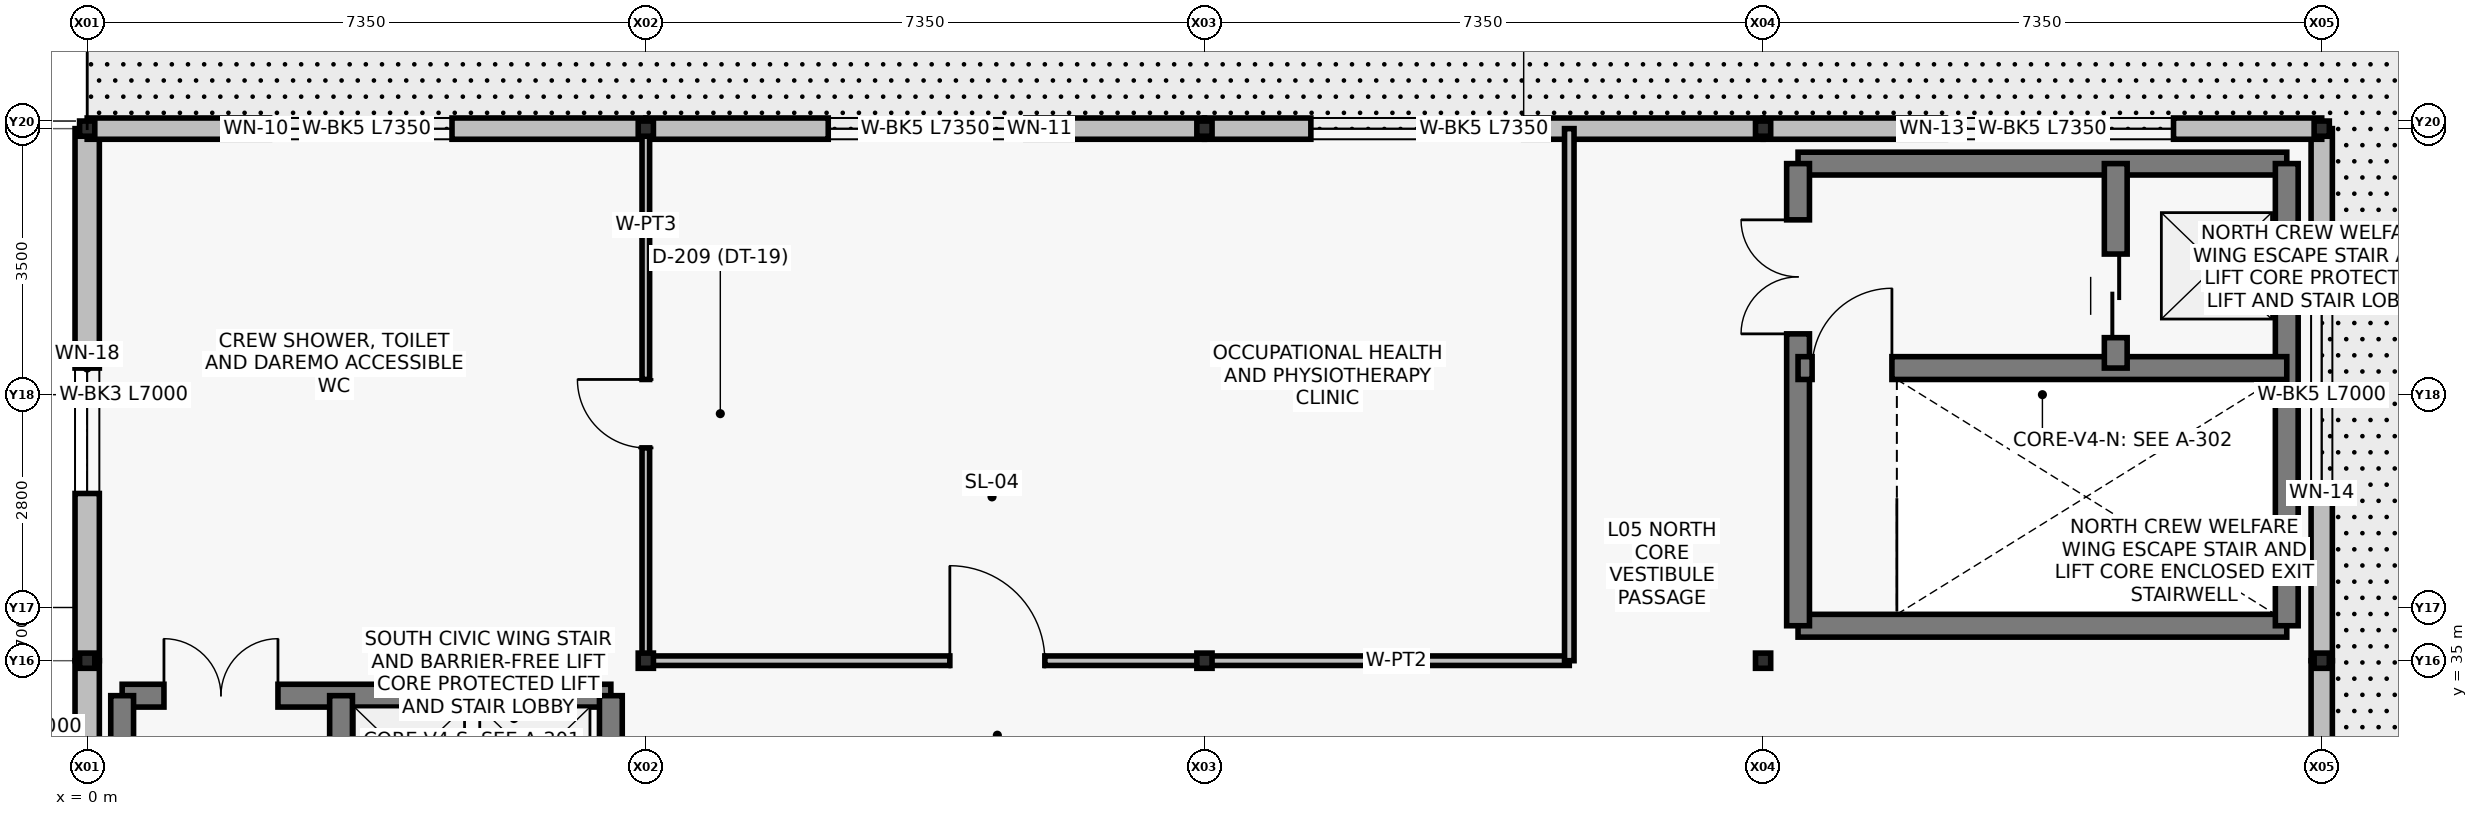
"""IFC4 building model, lengths in metres.
Left out: names, types, materials, properties, quantities, classifications, styles, units other than length and angle.
Written with IfcOpenShell. Run it as: python <this file> out.ifc"""

import sys

from ifc_helpers import new_model, si_unit, direction, frame, frame_2d, origin, origin_2d, place, context, subcontext, project, spatial, rectangle, i_section, extrude, element, fill, save


model = new_model("IFC4")
c1 = context("Model", 3, precision=1e-05, world=origin(), true_north=direction((0.0, 1.0)))
c2 = subcontext(c1, "Body", "Model", "MODEL_VIEW")
j1 = project(units=[si_unit("LENGTHUNIT", "METRE"), si_unit("PLANEANGLEUNIT", "RADIAN")], contexts=[c1])
p1 = place(None, origin())
s1 = spatial("IfcSite", under=j1, at=p1, CompositionType="ELEMENT")
p2 = place(p1, origin())
s2 = spatial("IfcBuilding", under=s1, at=p2, CompositionType="ELEMENT")
p3 = place(p2, frame((0.0, 0.0, 19.5)))
s3 = spatial("IfcBuildingStorey", under=s2, at=p3, CompositionType="ELEMENT", Elevation=19.5)
for number, where, z_axis, x_axis in (
    (1, (0.0, 35.0, 0.0), (0.0, 0.0, 1.0), (1.0, 0.0, 0.0)),
    (2, (0.0, 42.0, 0.0), (0.0, 0.0, 1.0), (1.0, 0.0, 0.0)),
    (3, (7.35, 35.0, 0.0), (0.0, 0.0, 1.0), (1.0, 0.0, 0.0)),
    (4, (7.35, 42.0, 0.0), (0.0, 0.0, 1.0), (1.0, 0.0, 0.0)),
    (5, (14.7, 35.0, 0.0), (0.0, 0.0, 1.0), (1.0, 0.0, 0.0)),
    (6, (14.7, 42.0, 0.0), (0.0, 0.0, 1.0), (1.0, 0.0, 0.0)),
    (7, (22.05, 35.0, 0.0), (0.0, 0.0, 1.0), (1.0, 0.0, 0.0)),
    (8, (22.05, 42.0, 0.0), (0.0, 0.0, 1.0), (1.0, 0.0, 0.0)),
    (9, (29.4, 35.0, 0.0), (0.0, 0.0, 1.0), (1.0, 0.0, 0.0)),
    (10, (29.4, 42.0, 0.0), (0.0, 0.0, 1.0), (1.0, 0.0, 0.0)),
):
    element("IfcColumn", number, at=place(p3, frame(where, z_axis=z_axis, x_axis=x_axis)), inside=s3, PredefinedType="COLUMN", context=c2, shape_type="SweptSolid", body=[
        extrude(i_section(OverallWidth=0.2, OverallDepth=0.2, WebThickness=0.008, FlangeThickness=0.012, at=origin_2d()), origin(), (0.0, 0.0, 1.0), 4.2),
    ])
p4 = place(p3, frame((0.0, 28.0, 0.0), z_axis=(0.0, 0.0, 1.0), x_axis=(0.0, 1.0, 0.0)))
e11 = element("IfcWall", 11, at=p4, inside=s3, PredefinedType="SOLIDWALL", context=c2, shape_type="SweptSolid", body=[
    extrude(rectangle(XDim=7.0, YDim=0.32, at=frame_2d((3.5, 0.0))), origin(), (0.0, 0.0, 1.0), 3.48),
])
p5 = place(p4, frame((2.2, 0.0, 0.9)))
e12 = element("IfcOpeningElement", 12, at=p5, cuts=e11, PredefinedType="OPENING", context=c2, shape_type="SweptSolid", body=[
    extrude(rectangle(XDim=3.0, YDim=1.8, at=frame_2d((1.5, 0.9))), frame((0.0, 0.17, 0.0), z_axis=(0.0, -1.0, 0.0), x_axis=(1.0, 0.0, 0.0)), (0.0, 0.0, 1.0), 0.34),
])
p6 = place(p3, frame((0.0, 35.0, 0.0), z_axis=(0.0, 0.0, 1.0), x_axis=(0.0, 1.0, 0.0)))
e13 = element("IfcWall", 13, at=p6, inside=s3, PredefinedType="SOLIDWALL", context=c2, shape_type="SweptSolid", body=[
    extrude(rectangle(XDim=7.0, YDim=0.32, at=frame_2d((3.5, 0.0))), origin(), (0.0, 0.0, 1.0), 3.48),
])
p7 = place(p6, frame((2.2, 0.0, 0.9)))
e14 = element("IfcOpeningElement", 14, at=p7, cuts=e13, PredefinedType="OPENING", context=c2, shape_type="SweptSolid", body=[
    extrude(rectangle(XDim=1.65, YDim=1.95, at=frame_2d((0.825, 0.975))), frame((0.0, 0.17, 0.0), z_axis=(0.0, -1.0, 0.0), x_axis=(1.0, 0.0, 0.0)), (0.0, 0.0, 1.0), 0.34),
])
p8 = place(p3, frame((29.4, 28.0, 0.0), z_axis=(0.0, 0.0, 1.0), x_axis=(0.0, 1.0, 0.0)))
e15 = element("IfcWall", 15, at=p8, inside=s3, PredefinedType="SOLIDWALL", context=c2, shape_type="SweptSolid", body=[
    extrude(rectangle(XDim=7.0, YDim=0.28, at=frame_2d((3.5, 0.0))), origin(), (0.0, 0.0, 1.0), 3.48),
])
p9 = place(p8, frame((2.2, 0.0, 0.9)))
e16 = element("IfcOpeningElement", 16, at=p9, cuts=e15, PredefinedType="OPENING", context=c2, shape_type="SweptSolid", body=[
    extrude(rectangle(XDim=3.0, YDim=1.8, at=frame_2d((1.5, 0.9))), frame((0.0, 0.15, 0.0), z_axis=(0.0, -1.0, 0.0), x_axis=(1.0, 0.0, 0.0)), (0.0, 0.0, 1.0), 0.3),
])
p10 = place(p3, frame((29.4, 35.0, 0.0), z_axis=(0.0, 0.0, 1.0), x_axis=(0.0, 1.0, 0.0)))
e17 = element("IfcWall", 17, at=p10, inside=s3, PredefinedType="SOLIDWALL", context=c2, shape_type="SweptSolid", body=[
    extrude(rectangle(XDim=7.0, YDim=0.28, at=frame_2d((3.5, 0.0))), origin(), (0.0, 0.0, 1.0), 3.48),
])
p11 = place(p10, frame((2.2, 0.0, 0.9)))
e18 = element("IfcOpeningElement", 18, at=p11, cuts=e17, PredefinedType="OPENING", context=c2, shape_type="SweptSolid", body=[
    extrude(rectangle(XDim=3.0, YDim=2.2, at=frame_2d((1.5, 1.1))), frame((0.0, 0.15, 0.0), z_axis=(0.0, -1.0, 0.0), x_axis=(1.0, 0.0, 0.0)), (0.0, 0.0, 1.0), 0.3),
])
p12 = place(p3, frame((0.0, 42.0, 0.0), z_axis=(0.0, 0.0, 1.0), x_axis=(1.0, 0.0, 0.0)))
e19 = element("IfcWall", 19, at=p12, inside=s3, PredefinedType="SOLIDWALL", context=c2, shape_type="SweptSolid", body=[
    extrude(rectangle(XDim=7.35, YDim=0.28, at=frame_2d((3.675, 0.0))), origin(), (0.0, 0.0, 1.0), 3.48),
])
p13 = place(p12, frame((2.4, 0.0, 0.9)))
e20 = element("IfcOpeningElement", 20, at=p13, cuts=e19, PredefinedType="OPENING", context=c2, shape_type="SweptSolid", body=[
    extrude(rectangle(XDim=2.4, YDim=2.1, at=frame_2d((1.2, 1.05))), frame((0.0, 0.15, 0.0), z_axis=(0.0, -1.0, 0.0), x_axis=(1.0, 0.0, 0.0)), (0.0, 0.0, 1.0), 0.3),
])
p14 = place(p3, frame((7.35, 42.0, 0.0), z_axis=(0.0, 0.0, 1.0), x_axis=(1.0, 0.0, 0.0)))
e21 = element("IfcWall", 21, at=p14, inside=s3, PredefinedType="SOLIDWALL", context=c2, shape_type="SweptSolid", body=[
    extrude(rectangle(XDim=7.35, YDim=0.28, at=frame_2d((3.675, 0.0))), origin(), (0.0, 0.0, 1.0), 3.48),
])
p15 = place(p14, frame((2.4, 0.0, 0.9)))
e22 = element("IfcOpeningElement", 22, at=p15, cuts=e21, PredefinedType="OPENING", context=c2, shape_type="SweptSolid", body=[
    extrude(rectangle(XDim=2.6, YDim=2.0, at=frame_2d((1.3, 1.0))), frame((0.0, 0.15, 0.0), z_axis=(0.0, -1.0, 0.0), x_axis=(1.0, 0.0, 0.0)), (0.0, 0.0, 1.0), 0.3),
])
p16 = place(p3, frame((14.7, 42.0, 0.0), z_axis=(0.0, 0.0, 1.0), x_axis=(1.0, 0.0, 0.0)))
e23 = element("IfcWall", 23, at=p16, inside=s3, PredefinedType="SOLIDWALL", context=c2, shape_type="SweptSolid", body=[
    extrude(rectangle(XDim=7.35, YDim=0.28, at=frame_2d((3.675, 0.0))), origin(), (0.0, 0.0, 1.0), 3.48),
])
p17 = place(p16, frame((1.4, 0.0, 0.9)))
e24 = element("IfcOpeningElement", 24, at=p17, cuts=e23, PredefinedType="OPENING", context=c2, shape_type="SweptSolid", body=[
    extrude(rectangle(XDim=2.8, YDim=2.1, at=frame_2d((1.4, 1.05))), frame((0.0, 0.15, 0.0), z_axis=(0.0, -1.0, 0.0), x_axis=(1.0, 0.0, 0.0)), (0.0, 0.0, 1.0), 0.3),
])
p18 = place(p3, frame((22.05, 42.0, 0.0), z_axis=(0.0, 0.0, 1.0), x_axis=(1.0, 0.0, 0.0)))
e25 = element("IfcWall", 25, at=p18, inside=s3, PredefinedType="SOLIDWALL", context=c2, shape_type="SweptSolid", body=[
    extrude(rectangle(XDim=7.35, YDim=0.28, at=frame_2d((3.675, 0.0))), origin(), (0.0, 0.0, 1.0), 3.48),
])
p19 = place(p18, frame((2.4, 0.0, 0.9)))
e26 = element("IfcOpeningElement", 26, at=p19, cuts=e25, PredefinedType="OPENING", context=c2, shape_type="SweptSolid", body=[
    extrude(rectangle(XDim=3.0, YDim=1.8, at=frame_2d((1.5, 0.9))), frame((0.0, 0.15, 0.0), z_axis=(0.0, -1.0, 0.0), x_axis=(1.0, 0.0, 0.0)), (0.0, 0.0, 1.0), 0.3),
])
p20 = place(p3, frame((0.46, 34.54, 0.0), z_axis=(0.0, 0.0, 1.0), x_axis=(1.0, 0.0, 0.0)))
e27 = element("IfcWall", 27, at=p20, inside=s3, PredefinedType="SHEAR", context=c2, shape_type="SweptSolid", body=[
    extrude(rectangle(XDim=6.43, YDim=0.3, at=frame_2d((3.215, 0.0))), origin(), (0.0, 0.0, 1.0), 3.92),
])
p21 = place(p20, frame((0.55, 0.0, 0.0)))
e28 = element("IfcOpeningElement", 28, at=p21, cuts=e27, PredefinedType="OPENING", context=c2, shape_type="SweptSolid", body=[
    extrude(rectangle(XDim=1.5, YDim=2.2, at=frame_2d((0.75, 1.1))), frame((0.0, 0.16, 0.0), z_axis=(0.0, -1.0, 0.0), x_axis=(1.0, 0.0, 0.0)), (0.0, 0.0, 1.0), 0.32),
])
for number, where, z_axis, x_axis in (
    (29, (0.46, 28.46, 0.0), (0.0, 0.0, 1.0), (0.0, 1.0, 0.0)),
    (30, (6.89, 28.46, 0.0), (0.0, 0.0, 1.0), (0.0, 1.0, 0.0)),
):
    element("IfcWall", number, at=place(p3, frame(where, z_axis=z_axis, x_axis=x_axis)), inside=s3, PredefinedType="SHEAR", context=c2, shape_type="SweptSolid", body=[
        extrude(rectangle(XDim=6.08, YDim=0.3, at=frame_2d((3.04, 0.0))), origin(), (0.0, 0.0, 1.0), 3.92),
    ])
p22 = place(p3, frame((3.34, 32.79, 0.0), z_axis=(0.0, 0.0, 1.0), x_axis=(0.0, 1.0, 0.0)))
e31 = element("IfcWall", 31, at=p22, inside=s3, PredefinedType="SHEAR", context=c2, shape_type="SweptSolid", body=[
    extrude(rectangle(XDim=1.75, YDim=0.3, at=frame_2d((0.875, 0.0))), origin(), (0.0, 0.0, 1.0), 3.92),
])
for number, where, z_axis, x_axis in (
    (32, (22.51, 35.46, 0.0), (0.0, 0.0, 1.0), (1.0, 0.0, 0.0)),
    (33, (22.51, 41.54, 0.0), (0.0, 0.0, 1.0), (1.0, 0.0, 0.0)),
):
    element("IfcWall", number, at=place(p3, frame(where, z_axis=z_axis, x_axis=x_axis)), inside=s3, PredefinedType="SHEAR", context=c2, shape_type="SweptSolid", body=[
        extrude(rectangle(XDim=6.43, YDim=0.3, at=frame_2d((3.215, 0.0))), origin(), (0.0, 0.0, 1.0), 3.92),
    ])
p23 = place(p3, frame((22.51, 35.46, 0.0), z_axis=(0.0, 0.0, 1.0), x_axis=(0.0, 1.0, 0.0)))
e34 = element("IfcWall", 34, at=p23, inside=s3, PredefinedType="SHEAR", context=c2, shape_type="SweptSolid", body=[
    extrude(rectangle(XDim=6.08, YDim=0.3, at=frame_2d((3.04, 0.0))), origin(), (0.0, 0.0, 1.0), 3.92),
])
p24 = place(p23, frame((3.84, 0.0, 0.0)))
e35 = element("IfcOpeningElement", 35, at=p24, cuts=e34, PredefinedType="OPENING", context=c2, shape_type="SweptSolid", body=[
    extrude(rectangle(XDim=1.5, YDim=2.2, at=frame_2d((0.75, 1.1))), frame((0.0, 0.16, 0.0), z_axis=(0.0, -1.0, 0.0), x_axis=(1.0, 0.0, 0.0)), (0.0, 0.0, 1.0), 0.32),
])
p25 = place(p3, frame((28.94, 35.46, 0.0), z_axis=(0.0, 0.0, 1.0), x_axis=(0.0, 1.0, 0.0)))
e36 = element("IfcWall", 36, at=p25, inside=s3, PredefinedType="SHEAR", context=c2, shape_type="SweptSolid", body=[
    extrude(rectangle(XDim=6.08, YDim=0.3, at=frame_2d((3.04, 0.0))), origin(), (0.0, 0.0, 1.0), 3.92),
])
p26 = place(p3, frame((22.51, 38.85, 0.0), z_axis=(0.0, 0.0, 1.0), x_axis=(1.0, 0.0, 0.0)))
e37 = element("IfcWall", 37, at=p26, inside=s3, PredefinedType="SHEAR", context=c2, shape_type="SweptSolid", body=[
    extrude(rectangle(XDim=6.43, YDim=0.3, at=frame_2d((3.215, 0.0))), origin(), (0.0, 0.0, 1.0), 3.92),
])
p27 = place(p26, frame((0.185, 0.0, 0.0)))
e38 = element("IfcOpeningElement", 38, at=p27, cuts=e37, PredefinedType="OPENING", context=c2, shape_type="SweptSolid", body=[
    extrude(rectangle(XDim=1.05, YDim=2.15, at=frame_2d((0.525, 1.075))), frame((0.0, 0.16, 0.0), z_axis=(0.0, -1.0, 0.0), x_axis=(1.0, 0.0, 0.0)), (0.0, 0.0, 1.0), 0.32),
])
p28 = place(p3, frame((26.69, 38.85, 0.0), z_axis=(0.0, 0.0, 1.0), x_axis=(0.0, 1.0, 0.0)))
e39 = element("IfcWall", 39, at=p28, inside=s3, PredefinedType="SHEAR", context=c2, shape_type="SweptSolid", body=[
    extrude(rectangle(XDim=2.69, YDim=0.3, at=frame_2d((1.345, 0.0))), origin(), (0.0, 0.0, 1.0), 3.92),
])
p29 = place(p28, frame((0.4, 0.0, 0.0)))
e40 = element("IfcOpeningElement", 40, at=p29, cuts=e39, PredefinedType="OPENING", context=c2, shape_type="SweptSolid", body=[
    extrude(rectangle(XDim=1.1, YDim=2.15, at=frame_2d((0.55, 1.075))), frame((0.0, 0.16, 0.0), z_axis=(0.0, -1.0, 0.0), x_axis=(1.0, 0.0, 0.0)), (0.0, 0.0, 1.0), 0.32),
])
p30 = place(p3, frame((7.35, 35.0, 0.0), z_axis=(0.0, 0.0, 1.0), x_axis=(1.0, 0.0, 0.0)))
e41 = element("IfcWall", 41, at=p30, inside=s3, PredefinedType="PARTITIONING", context=c2, shape_type="SweptSolid", body=[
    extrude(rectangle(XDim=12.15, YDim=0.125, at=frame_2d((6.075, 0.0))), origin(), (0.0, 0.0, 1.0), 3.25),
])
p31 = place(p30, frame((4.0, 0.0, 0.0)))
e42 = element("IfcOpeningElement", 42, at=p31, cuts=e41, PredefinedType="OPENING", context=c2, shape_type="SweptSolid", body=[
    extrude(rectangle(XDim=1.25, YDim=2.15, at=frame_2d((0.625, 1.075))), frame((0.0, 0.072, 0.0), z_axis=(0.0, -1.0, 0.0), x_axis=(1.0, 0.0, 0.0)), (0.0, 0.0, 1.0), 0.145),
])
p32 = place(p3, frame((19.5, 35.0, 0.0), z_axis=(0.0, 0.0, 1.0), x_axis=(0.0, 1.0, 0.0)))
e43 = element("IfcWall", 43, at=p32, inside=s3, PredefinedType="PARTITIONING", context=c2, shape_type="SweptSolid", body=[
    extrude(rectangle(XDim=7.0, YDim=0.125, at=frame_2d((3.5, 0.0))), origin(), (0.0, 0.0, 1.0), 3.25),
])
p33 = place(p3, frame((7.35, 35.0, 0.0), z_axis=(0.0, 0.0, 1.0), x_axis=(0.0, 1.0, 0.0)))
e44 = element("IfcWall", 44, at=p33, inside=s3, PredefinedType="PARTITIONING", context=c2, shape_type="SweptSolid", body=[
    extrude(rectangle(XDim=7.0, YDim=0.1, at=frame_2d((3.5, 0.0))), origin(), (0.0, 0.0, 1.0), 3.25),
])
p34 = place(p33, frame((2.8, 0.0, 0.0)))
e45 = element("IfcOpeningElement", 45, at=p34, cuts=e44, PredefinedType="OPENING", context=c2, shape_type="SweptSolid", body=[
    extrude(rectangle(XDim=0.9, YDim=2.1, at=frame_2d((0.45, 1.05))), frame((0.0, 0.06, 0.0), z_axis=(0.0, -1.0, 0.0), x_axis=(1.0, 0.0, 0.0)), (0.0, 0.0, 1.0), 0.12),
])
p35 = place(p7, origin())
e46 = element("IfcWindow", 46, at=p35, inside=s3, PartitioningType="SINGLE_PANEL", PredefinedType="WINDOW", context=c2, shape_type="SweptSolid", body=[
    extrude(rectangle(XDim=1.65, YDim=1.95, at=frame_2d((0.825, 0.975))), frame((0.0, 0.03, 0.0), z_axis=(0.0, -1.0, 0.0), x_axis=(1.0, 0.0, 0.0)), (0.0, 0.0, 1.0), 0.06),
])
fill(e14, e46)
p36 = place(p11, origin())
e47 = element("IfcWindow", 47, at=p36, inside=s3, PartitioningType="SINGLE_PANEL", PredefinedType="WINDOW", context=c2, shape_type="SweptSolid", body=[
    extrude(rectangle(XDim=3.0, YDim=2.2, at=frame_2d((1.5, 1.1))), frame((0.0, 0.03, 0.0), z_axis=(0.0, -1.0, 0.0), x_axis=(1.0, 0.0, 0.0)), (0.0, 0.0, 1.0), 0.06),
])
fill(e18, e47)
p37 = place(p13, origin())
e48 = element("IfcWindow", 48, at=p37, inside=s3, PartitioningType="SINGLE_PANEL", PredefinedType="WINDOW", context=c2, shape_type="SweptSolid", body=[
    extrude(rectangle(XDim=2.4, YDim=2.1, at=frame_2d((1.2, 1.05))), frame((0.0, 0.03, 0.0), z_axis=(0.0, -1.0, 0.0), x_axis=(1.0, 0.0, 0.0)), (0.0, 0.0, 1.0), 0.06),
])
fill(e20, e48)
p38 = place(p15, origin())
e49 = element("IfcWindow", 49, at=p38, inside=s3, PartitioningType="SINGLE_PANEL", PredefinedType="WINDOW", context=c2, shape_type="SweptSolid", body=[
    extrude(rectangle(XDim=2.6, YDim=2.0, at=frame_2d((1.3, 1.0))), frame((0.0, 0.03, 0.0), z_axis=(0.0, -1.0, 0.0), x_axis=(1.0, 0.0, 0.0)), (0.0, 0.0, 1.0), 0.06),
])
fill(e22, e49)
p39 = place(p17, origin())
e50 = element("IfcWindow", 50, at=p39, inside=s3, PartitioningType="SINGLE_PANEL", PredefinedType="WINDOW", context=c2, shape_type="SweptSolid", body=[
    extrude(rectangle(XDim=2.8, YDim=2.1, at=frame_2d((1.4, 1.05))), frame((0.0, 0.03, 0.0), z_axis=(0.0, -1.0, 0.0), x_axis=(1.0, 0.0, 0.0)), (0.0, 0.0, 1.0), 0.06),
])
fill(e24, e50)
p40 = place(p19, origin())
e51 = element("IfcWindow", 51, at=p40, inside=s3, PartitioningType="SINGLE_PANEL", PredefinedType="WINDOW", context=c2, shape_type="SweptSolid", body=[
    extrude(rectangle(XDim=3.0, YDim=1.8, at=frame_2d((1.5, 0.9))), frame((0.0, 0.03, 0.0), z_axis=(0.0, -1.0, 0.0), x_axis=(1.0, 0.0, 0.0)), (0.0, 0.0, 1.0), 0.06),
])
fill(e26, e51)
p41 = place(p21, origin())
e52 = element("IfcDoor", 52, at=p41, inside=s3, OperationType="DOUBLE_DOOR_SINGLE_SWING", PredefinedType="DOOR", context=c2, shape_type="SweptSolid", body=[
    extrude(rectangle(XDim=1.5, YDim=2.2, at=frame_2d((0.75, 1.1))), frame((0.0, 0.025, 0.0), z_axis=(0.0, -1.0, 0.0), x_axis=(1.0, 0.0, 0.0)), (0.0, 0.0, 1.0), 0.05),
])
fill(e28, e52)
p42 = place(p27, origin())
e53 = element("IfcDoor", 53, at=p42, inside=s3, OperationType="SINGLE_SWING_RIGHT", PredefinedType="DOOR", context=c2, shape_type="SweptSolid", body=[
    extrude(rectangle(XDim=1.05, YDim=2.15, at=frame_2d((0.525, 1.075))), frame((0.0, 0.025, 0.0), z_axis=(0.0, -1.0, 0.0), x_axis=(1.0, 0.0, 0.0)), (0.0, 0.0, 1.0), 0.05),
])
fill(e38, e53)
p43 = place(p24, origin())
e54 = element("IfcDoor", 54, at=p43, inside=s3, OperationType="DOUBLE_DOOR_SINGLE_SWING", PredefinedType="DOOR", context=c2, shape_type="SweptSolid", body=[
    extrude(rectangle(XDim=1.5, YDim=2.2, at=frame_2d((0.75, 1.1))), frame((0.0, 0.025, 0.0), z_axis=(0.0, -1.0, 0.0), x_axis=(1.0, 0.0, 0.0)), (0.0, 0.0, 1.0), 0.05),
])
fill(e35, e54)
p44 = place(p29, origin())
e55 = element("IfcDoor", 55, at=p44, inside=s3, OperationType="SLIDING_TO_LEFT", PredefinedType="DOOR", context=c2, shape_type="SweptSolid", body=[
    extrude(rectangle(XDim=1.1, YDim=2.15, at=frame_2d((0.55, 1.075))), frame((0.0, 0.025, 0.0), z_axis=(0.0, -1.0, 0.0), x_axis=(1.0, 0.0, 0.0)), (0.0, 0.0, 1.0), 0.05),
])
fill(e40, e55)
p45 = place(p31, origin())
e56 = element("IfcDoor", 56, at=p45, inside=s3, OperationType="SINGLE_SWING_LEFT", PredefinedType="DOOR", context=c2, shape_type="SweptSolid", body=[
    extrude(rectangle(XDim=1.25, YDim=2.15, at=frame_2d((0.625, 1.075))), frame((0.0, 0.025, 0.0), z_axis=(0.0, -1.0, 0.0), x_axis=(1.0, 0.0, 0.0)), (0.0, 0.0, 1.0), 0.05),
])
fill(e42, e56)
p46 = place(p34, origin())
e57 = element("IfcDoor", 57, at=p46, inside=s3, OperationType="SINGLE_SWING_RIGHT", PredefinedType="DOOR", context=c2, shape_type="SweptSolid", body=[
    extrude(rectangle(XDim=0.9, YDim=2.1, at=frame_2d((0.45, 1.05))), frame((0.0, 0.025, 0.0), z_axis=(0.0, -1.0, 0.0), x_axis=(1.0, 0.0, 0.0)), (0.0, 0.0, 1.0), 0.05),
])
fill(e45, e57)
save(model, sys.argv[1])
